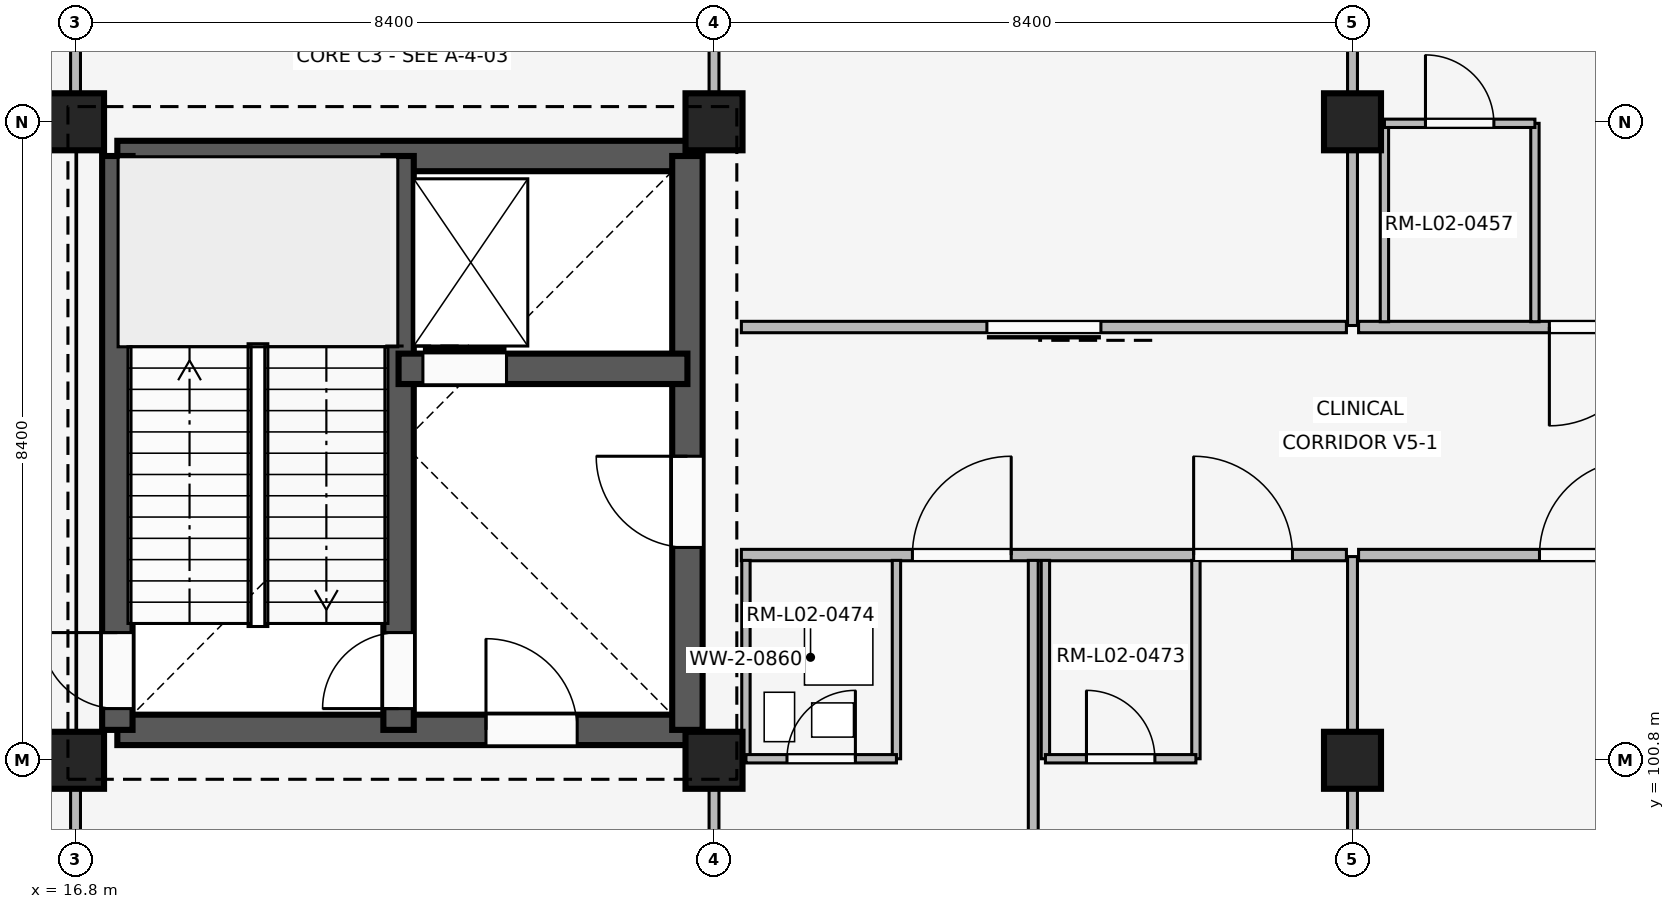
"""IFC4 building model, lengths in metres.
Left out: names, types, materials, properties, quantities, classifications, styles, units other than length and angle.
Written with IfcOpenShell. Run it as: python <this file> out.ifc"""

import sys

from ifc_helpers import new_model, si_unit, direction, frame, frame_2d, origin, origin_2d, place, context, subcontext, project, spatial, rectangle, extrude, element, fill, save


model = new_model("IFC4")
c1 = context("Model", 3, precision=1e-05, world=origin(), true_north=direction((0.0, 1.0)))
c2 = subcontext(c1, "Body", "Model", "MODEL_VIEW")
j1 = project(units=[si_unit("LENGTHUNIT", "METRE"), si_unit("PLANEANGLEUNIT", "RADIAN")], contexts=[c1])
p1 = place(None, origin())
s1 = spatial("IfcSite", under=j1, at=p1, CompositionType="ELEMENT")
p2 = place(p1, origin())
s2 = spatial("IfcBuilding", under=s1, at=p2, CompositionType="ELEMENT")
p3 = place(p2, frame((0.0, 0.0, 8.1)))
s3 = spatial("IfcBuildingStorey", under=s2, at=p3, CompositionType="ELEMENT", Elevation=8.1)
for number, where, z_axis, x_axis in (
    (1, (16.8, 100.8, 0.0), (0.0, 0.0, 1.0), (1.0, 0.0, 0.0)),
    (2, (16.8, 109.2, 0.0), (0.0, 0.0, 1.0), (1.0, 0.0, 0.0)),
    (3, (25.2, 100.8, 0.0), (0.0, 0.0, 1.0), (1.0, 0.0, 0.0)),
    (4, (25.2, 109.2, 0.0), (0.0, 0.0, 1.0), (1.0, 0.0, 0.0)),
    (5, (33.6, 100.8, 0.0), (0.0, 0.0, 1.0), (1.0, 0.0, 0.0)),
    (6, (33.6, 109.2, 0.0), (0.0, 0.0, 1.0), (1.0, 0.0, 0.0)),
):
    element("IfcColumn", number, at=place(p3, frame(where, z_axis=z_axis, x_axis=x_axis)), inside=s3, PredefinedType="COLUMN", context=c2, shape_type="SweptSolid", body=[
        extrude(rectangle(XDim=0.75, YDim=0.75, at=origin_2d()), origin(), (0.0, 0.0, 1.0), 4.8),
    ])
p4 = place(p3, frame((17.35, 101.2, 0.0), z_axis=(0.0, 0.0, 1.0), x_axis=(1.0, 0.0, 0.0)))
e7 = element("IfcWall", 7, at=p4, inside=s3, PredefinedType="SHEAR", context=c2, shape_type="SweptSolid", body=[
    extrude(rectangle(XDim=7.5, YDim=0.4, at=frame_2d((3.75, 0.0))), origin(), (0.0, 0.0, 1.0), 4.52),
])
p5 = place(p4, frame((4.85, 0.0, 0.0)))
e8 = element("IfcOpeningElement", 8, at=p5, cuts=e7, PredefinedType="OPENING", context=c2, shape_type="SweptSolid", body=[
    extrude(rectangle(XDim=1.2, YDim=2.2, at=frame_2d((0.6, 1.1))), frame((0.0, 0.21, 0.0), z_axis=(0.0, -1.0, 0.0), x_axis=(1.0, 0.0, 0.0)), (0.0, 0.0, 1.0), 0.42),
])
p6 = place(p3, frame((17.35, 108.75, 0.0), z_axis=(0.0, 0.0, 1.0), x_axis=(1.0, 0.0, 0.0)))
e9 = element("IfcWall", 9, at=p6, inside=s3, PredefinedType="SHEAR", context=c2, shape_type="SweptSolid", body=[
    extrude(rectangle(XDim=7.5, YDim=0.4, at=frame_2d((3.75, 0.0))), origin(), (0.0, 0.0, 1.0), 4.52),
])
p7 = place(p3, frame((17.35, 101.2, 0.0), z_axis=(0.0, 0.0, 1.0), x_axis=(0.0, 1.0, 0.0)))
e10 = element("IfcWall", 10, at=p7, inside=s3, PredefinedType="SHEAR", context=c2, shape_type="SweptSolid", body=[
    extrude(rectangle(XDim=7.55, YDim=0.4, at=frame_2d((3.775, 0.0))), origin(), (0.0, 0.0, 1.0), 4.52),
])
p8 = place(p7, frame((0.28, 0.0, 0.0)))
e11 = element("IfcOpeningElement", 11, at=p8, cuts=e10, PredefinedType="OPENING", context=c2, shape_type="SweptSolid", body=[
    extrude(rectangle(XDim=1.0, YDim=2.15, at=frame_2d((0.5, 1.075))), frame((0.0, 0.21, 0.0), z_axis=(0.0, -1.0, 0.0), x_axis=(1.0, 0.0, 0.0)), (0.0, 0.0, 1.0), 0.42),
])
p9 = place(p3, frame((24.85, 101.2, 0.0), z_axis=(0.0, 0.0, 1.0), x_axis=(0.0, 1.0, 0.0)))
e12 = element("IfcWall", 12, at=p9, inside=s3, PredefinedType="SHEAR", context=c2, shape_type="SweptSolid", body=[
    extrude(rectangle(XDim=7.55, YDim=0.4, at=frame_2d((3.775, 0.0))), origin(), (0.0, 0.0, 1.0), 4.52),
])
p10 = place(p9, frame((2.4, 0.0, 0.0)))
e13 = element("IfcOpeningElement", 13, at=p10, cuts=e12, PredefinedType="OPENING", context=c2, shape_type="SweptSolid", body=[
    extrude(rectangle(XDim=1.2, YDim=2.2, at=frame_2d((0.6, 1.1))), frame((0.0, 0.21, 0.0), z_axis=(0.0, -1.0, 0.0), x_axis=(1.0, 0.0, 0.0)), (0.0, 0.0, 1.0), 0.42),
])
p11 = place(p3, frame((21.05, 101.2, 0.0), z_axis=(0.0, 0.0, 1.0), x_axis=(0.0, 1.0, 0.0)))
e14 = element("IfcWall", 14, at=p11, inside=s3, PredefinedType="SHEAR", context=c2, shape_type="SweptSolid", body=[
    extrude(rectangle(XDim=7.55, YDim=0.4, at=frame_2d((3.775, 0.0))), origin(), (0.0, 0.0, 1.0), 4.52),
])
p12 = place(p11, frame((0.28, 0.0, 0.0)))
e15 = element("IfcOpeningElement", 15, at=p12, cuts=e14, PredefinedType="OPENING", context=c2, shape_type="SweptSolid", body=[
    extrude(rectangle(XDim=1.0, YDim=2.15, at=frame_2d((0.5, 1.075))), frame((0.0, 0.21, 0.0), z_axis=(0.0, -1.0, 0.0), x_axis=(1.0, 0.0, 0.0)), (0.0, 0.0, 1.0), 0.42),
])
p13 = place(p3, frame((21.05, 105.95, 0.0), z_axis=(0.0, 0.0, 1.0), x_axis=(1.0, 0.0, 0.0)))
e16 = element("IfcWall", 16, at=p13, inside=s3, PredefinedType="SHEAR", context=c2, shape_type="SweptSolid", body=[
    extrude(rectangle(XDim=3.8, YDim=0.4, at=frame_2d((1.9, 0.0))), origin(), (0.0, 0.0, 1.0), 4.52),
])
p14 = place(p13, frame((0.32, 0.0, 0.0)))
e17 = element("IfcOpeningElement", 17, at=p14, cuts=e16, PredefinedType="OPENING", context=c2, shape_type="SweptSolid", body=[
    extrude(rectangle(XDim=1.1, YDim=2.15, at=frame_2d((0.55, 1.075))), frame((0.0, 0.21, 0.0), z_axis=(0.0, -1.0, 0.0), x_axis=(1.0, 0.0, 0.0)), (0.0, 0.0, 1.0), 0.42),
])
p15 = place(p3, frame((16.8, 92.54, 0.0), z_axis=(0.0, 0.0, 1.0), x_axis=(0.0, 1.0, 0.0)))
e18 = element("IfcWall", 18, at=p15, inside=s3, PredefinedType="PARTITIONING", context=c2, shape_type="SweptSolid", body=[
    extrude(rectangle(XDim=8.21, YDim=0.13, at=frame_2d((4.105, 0.0))), origin(), (0.0, 0.0, 1.0), 3.84),
])
p16 = place(p3, frame((16.8, 109.55, 0.0), z_axis=(0.0, 0.0, 1.0), x_axis=(0.0, 1.0, 0.0)))
e19 = element("IfcWall", 19, at=p16, inside=s3, PredefinedType="PARTITIONING", context=c2, shape_type="SweptSolid", body=[
    extrude(rectangle(XDim=7.91, YDim=0.13, at=frame_2d((3.955, 0.0))), origin(), (0.0, 0.0, 1.0), 3.84),
])
p17 = place(p3, frame((25.2, 92.54, 0.0), z_axis=(0.0, 0.0, 1.0), x_axis=(0.0, 1.0, 0.0)))
e20 = element("IfcWall", 20, at=p17, inside=s3, PredefinedType="PARTITIONING", context=c2, shape_type="SweptSolid", body=[
    extrude(rectangle(XDim=8.21, YDim=0.13, at=frame_2d((4.105, 0.0))), origin(), (0.0, 0.0, 1.0), 3.84),
])
p18 = place(p17, frame((3.64, 0.0, 0.0)))
e21 = element("IfcOpeningElement", 21, at=p18, cuts=e20, PredefinedType="OPENING", context=c2, shape_type="SweptSolid", body=[
    extrude(rectangle(XDim=1.08, YDim=2.15, at=frame_2d((0.54, 1.075))), frame((0.0, 0.075, 0.0), z_axis=(0.0, -1.0, 0.0), x_axis=(1.0, 0.0, 0.0)), (0.0, 0.0, 1.0), 0.15),
])
p19 = place(p3, frame((25.2, 109.55, 0.0), z_axis=(0.0, 0.0, 1.0), x_axis=(0.0, 1.0, 0.0)))
e22 = element("IfcWall", 22, at=p19, inside=s3, PredefinedType="PARTITIONING", context=c2, shape_type="SweptSolid", body=[
    extrude(rectangle(XDim=7.91, YDim=0.13, at=frame_2d((3.955, 0.0))), origin(), (0.0, 0.0, 1.0), 3.84),
])
p20 = place(p19, frame((3.4, 0.0, 0.0)))
e23 = element("IfcOpeningElement", 23, at=p20, cuts=e22, PredefinedType="OPENING", context=c2, shape_type="SweptSolid", body=[
    extrude(rectangle(XDim=1.05, YDim=2.2, at=frame_2d((0.525, 1.1))), frame((0.0, 0.075, 0.0), z_axis=(0.0, -1.0, 0.0), x_axis=(1.0, 0.0, 0.0)), (0.0, 0.0, 1.0), 0.15),
])
p21 = place(p3, frame((25.56, 103.5, 0.0), z_axis=(0.0, 0.0, 1.0), x_axis=(1.0, 0.0, 0.0)))
e24 = element("IfcWall", 24, at=p21, inside=s3, PredefinedType="PARTITIONING", context=c2, shape_type="SweptSolid", body=[
    extrude(rectangle(XDim=7.96, YDim=0.15, at=frame_2d((3.98, 0.0))), origin(), (0.0, 0.0, 1.0), 3.84),
])
p22 = place(p21, frame((2.25, 0.0, 0.0)))
e25 = element("IfcOpeningElement", 25, at=p22, cuts=e24, PredefinedType="OPENING", context=c2, shape_type="SweptSolid", body=[
    extrude(rectangle(XDim=1.3, YDim=2.25, at=frame_2d((0.65, 1.125))), frame((0.0, 0.085, 0.0), z_axis=(0.0, -1.0, 0.0), x_axis=(1.0, 0.0, 0.0)), (0.0, 0.0, 1.0), 0.17),
])
p23 = place(p21, frame((5.95, 0.0, 0.0)))
e26 = element("IfcOpeningElement", 26, at=p23, cuts=e24, PredefinedType="OPENING", context=c2, shape_type="SweptSolid", body=[
    extrude(rectangle(XDim=1.3, YDim=2.25, at=frame_2d((0.65, 1.125))), frame((0.0, 0.085, 0.0), z_axis=(0.0, -1.0, 0.0), x_axis=(1.0, 0.0, 0.0)), (0.0, 0.0, 1.0), 0.17),
])
p24 = place(p3, frame((29.4, 92.5, 0.0), z_axis=(0.0, 0.0, 1.0), x_axis=(0.0, 1.0, 0.0)))
e27 = element("IfcWall", 27, at=p24, inside=s3, PredefinedType="PARTITIONING", context=c2, shape_type="SweptSolid", body=[
    extrude(rectangle(XDim=10.93, YDim=0.13, at=frame_2d((5.465, 0.0))), origin(), (0.0, 0.0, 1.0), 3.84),
])
for number, where, z_axis, x_axis in (
    (28, (25.62, 100.82, 0.0), (0.0, 0.0, 1.0), (0.0, 1.0, 0.0)),
    (29, (27.6, 100.82, 0.0), (0.0, 0.0, 1.0), (0.0, 1.0, 0.0)),
):
    element("IfcWall", number, at=place(p3, frame(where, z_axis=z_axis, x_axis=x_axis)), inside=s3, PredefinedType="PARTITIONING", context=c2, shape_type="SweptSolid", body=[
        extrude(rectangle(XDim=2.61, YDim=0.11, at=frame_2d((1.305, 0.0))), origin(), (0.0, 0.0, 1.0), 3.84),
    ])
p25 = place(p3, frame((25.62, 100.82, 0.0), z_axis=(0.0, 0.0, 1.0), x_axis=(1.0, 0.0, 0.0)))
e30 = element("IfcWall", 30, at=p25, inside=s3, PredefinedType="PARTITIONING", context=c2, shape_type="SweptSolid", body=[
    extrude(rectangle(XDim=1.98, YDim=0.11, at=frame_2d((0.99, 0.0))), origin(), (0.0, 0.0, 1.0), 3.84),
])
p26 = place(p25, frame((0.54, 0.0, 0.0)))
e31 = element("IfcOpeningElement", 31, at=p26, cuts=e30, PredefinedType="OPENING", context=c2, shape_type="SweptSolid", body=[
    extrude(rectangle(XDim=0.9, YDim=2.1, at=frame_2d((0.45, 1.05))), frame((0.0, 0.065, 0.0), z_axis=(0.0, -1.0, 0.0), x_axis=(1.0, 0.0, 0.0)), (0.0, 0.0, 1.0), 0.13),
])
for number, where, z_axis, x_axis in (
    (32, (29.56, 100.82, 0.0), (0.0, 0.0, 1.0), (0.0, 1.0, 0.0)),
    (33, (31.54, 100.82, 0.0), (0.0, 0.0, 1.0), (0.0, 1.0, 0.0)),
):
    element("IfcWall", number, at=place(p3, frame(where, z_axis=z_axis, x_axis=x_axis)), inside=s3, PredefinedType="PARTITIONING", context=c2, shape_type="SweptSolid", body=[
        extrude(rectangle(XDim=2.61, YDim=0.11, at=frame_2d((1.305, 0.0))), origin(), (0.0, 0.0, 1.0), 3.84),
    ])
p27 = place(p3, frame((29.56, 100.82, 0.0), z_axis=(0.0, 0.0, 1.0), x_axis=(1.0, 0.0, 0.0)))
e34 = element("IfcWall", 34, at=p27, inside=s3, PredefinedType="PARTITIONING", context=c2, shape_type="SweptSolid", body=[
    extrude(rectangle(XDim=1.98, YDim=0.11, at=frame_2d((0.99, 0.0))), origin(), (0.0, 0.0, 1.0), 3.84),
])
p28 = place(p27, frame((0.54, 0.0, 0.0)))
e35 = element("IfcOpeningElement", 35, at=p28, cuts=e34, PredefinedType="OPENING", context=c2, shape_type="SweptSolid", body=[
    extrude(rectangle(XDim=0.9, YDim=2.1, at=frame_2d((0.45, 1.05))), frame((0.0, 0.065, 0.0), z_axis=(0.0, -1.0, 0.0), x_axis=(1.0, 0.0, 0.0)), (0.0, 0.0, 1.0), 0.13),
])
p29 = place(p3, frame((33.52, 106.5, 0.0), z_axis=(0.0, 0.0, 1.0), x_axis=(-1.0, 0.0, 0.0)))
e36 = element("IfcWall", 36, at=p29, inside=s3, PredefinedType="PARTITIONING", context=c2, shape_type="SweptSolid", body=[
    extrude(rectangle(XDim=7.96, YDim=0.15, at=frame_2d((3.98, 0.0))), origin(), (0.0, 0.0, 1.0), 3.84),
])
p30 = place(p29, frame((3.23, 0.0, 0.0)))
e37 = element("IfcOpeningElement", 37, at=p30, cuts=e36, PredefinedType="OPENING", context=c2, shape_type="SweptSolid", body=[
    extrude(rectangle(XDim=1.5, YDim=2.3, at=frame_2d((0.75, 1.15))), frame((0.0, 0.085, 0.0), z_axis=(0.0, -1.0, 0.0), x_axis=(1.0, 0.0, 0.0)), (0.0, 0.0, 1.0), 0.17),
])
for number, where, z_axis, x_axis in (
    (38, (33.6, 92.54, 0.0), (0.0, 0.0, 1.0), (0.0, 1.0, 0.0)),
    (39, (33.6, 106.52, 0.0), (0.0, 0.0, 1.0), (0.0, 1.0, 0.0)),
):
    element("IfcWall", number, at=place(p3, frame(where, z_axis=z_axis, x_axis=x_axis)), inside=s3, PredefinedType="PARTITIONING", context=c2, shape_type="SweptSolid", body=[
        extrude(rectangle(XDim=10.94, YDim=0.13, at=frame_2d((5.47, 0.0))), origin(), (0.0, 0.0, 1.0), 3.84),
    ])
p31 = place(p3, frame((33.68, 103.5, 0.0), z_axis=(0.0, 0.0, 1.0), x_axis=(1.0, 0.0, 0.0)))
e40 = element("IfcWall", 40, at=p31, inside=s3, PredefinedType="PARTITIONING", context=c2, shape_type="SweptSolid", body=[
    extrude(rectangle(XDim=5.78, YDim=0.15, at=frame_2d((2.89, 0.0))), origin(), (0.0, 0.0, 1.0), 3.84),
])
p32 = place(p31, frame((2.38, 0.0, 0.0)))
e41 = element("IfcOpeningElement", 41, at=p32, cuts=e40, PredefinedType="OPENING", context=c2, shape_type="SweptSolid", body=[
    extrude(rectangle(XDim=1.25, YDim=2.2, at=frame_2d((0.625, 1.1))), frame((0.0, 0.085, 0.0), z_axis=(0.0, -1.0, 0.0), x_axis=(1.0, 0.0, 0.0)), (0.0, 0.0, 1.0), 0.17),
])
p33 = place(p3, frame((41.64, 106.5, 0.0), z_axis=(0.0, 0.0, 1.0), x_axis=(-1.0, 0.0, 0.0)))
e42 = element("IfcWall", 42, at=p33, inside=s3, PredefinedType="PARTITIONING", context=c2, shape_type="SweptSolid", body=[
    extrude(rectangle(XDim=7.96, YDim=0.15, at=frame_2d((3.98, 0.0))), origin(), (0.0, 0.0, 1.0), 3.84),
])
p34 = place(p33, frame((0.45, 0.0, 0.0)))
e43 = element("IfcOpeningElement", 43, at=p34, cuts=e42, PredefinedType="OPENING", context=c2, shape_type="SweptSolid", body=[
    extrude(rectangle(XDim=1.3, YDim=2.25, at=frame_2d((0.65, 1.125))), frame((0.0, 0.085, 0.0), z_axis=(0.0, -1.0, 0.0), x_axis=(1.0, 0.0, 0.0)), (0.0, 0.0, 1.0), 0.17),
])
p35 = place(p33, frame((4.15, 0.0, 0.0)))
e44 = element("IfcOpeningElement", 44, at=p35, cuts=e42, PredefinedType="OPENING", context=c2, shape_type="SweptSolid", body=[
    extrude(rectangle(XDim=1.3, YDim=2.25, at=frame_2d((0.65, 1.125))), frame((0.0, 0.085, 0.0), z_axis=(0.0, -1.0, 0.0), x_axis=(1.0, 0.0, 0.0)), (0.0, 0.0, 1.0), 0.17),
])
for number, where, z_axis, x_axis in (
    (45, (34.02, 106.57, 0.0), (0.0, 0.0, 1.0), (0.0, 1.0, 0.0)),
    (46, (36.0, 106.57, 0.0), (0.0, 0.0, 1.0), (0.0, 1.0, 0.0)),
):
    element("IfcWall", number, at=place(p3, frame(where, z_axis=z_axis, x_axis=x_axis)), inside=s3, PredefinedType="PARTITIONING", context=c2, shape_type="SweptSolid", body=[
        extrude(rectangle(XDim=2.61, YDim=0.11, at=frame_2d((1.305, 0.0))), origin(), (0.0, 0.0, 1.0), 3.84),
    ])
p36 = place(p3, frame((34.02, 109.18, 0.0), z_axis=(0.0, 0.0, 1.0), x_axis=(1.0, 0.0, 0.0)))
e47 = element("IfcWall", 47, at=p36, inside=s3, PredefinedType="PARTITIONING", context=c2, shape_type="SweptSolid", body=[
    extrude(rectangle(XDim=1.98, YDim=0.11, at=frame_2d((0.99, 0.0))), origin(), (0.0, 0.0, 1.0), 3.84),
])
p37 = place(p36, frame((0.54, 0.0, 0.0)))
e48 = element("IfcOpeningElement", 48, at=p37, cuts=e47, PredefinedType="OPENING", context=c2, shape_type="SweptSolid", body=[
    extrude(rectangle(XDim=0.9, YDim=2.1, at=frame_2d((0.45, 1.05))), frame((0.0, 0.065, 0.0), z_axis=(0.0, -1.0, 0.0), x_axis=(1.0, 0.0, 0.0)), (0.0, 0.0, 1.0), 0.13),
])
p38 = place(p10, origin())
e49 = element("IfcDoor", 49, at=p38, inside=s3, OperationType="SINGLE_SWING_RIGHT", PredefinedType="DOOR", context=c2, shape_type="SweptSolid", body=[
    extrude(rectangle(XDim=1.2, YDim=2.2, at=frame_2d((0.6, 1.1))), frame((0.0, 0.025, 0.0), z_axis=(0.0, -1.0, 0.0), x_axis=(1.0, 0.0, 0.0)), (0.0, 0.0, 1.0), 0.05),
])
fill(e13, e49)
p39 = place(p5, origin())
e50 = element("IfcDoor", 50, at=p39, inside=s3, OperationType="SINGLE_SWING_LEFT", PredefinedType="DOOR", context=c2, shape_type="SweptSolid", body=[
    extrude(rectangle(XDim=1.2, YDim=2.2, at=frame_2d((0.6, 1.1))), frame((0.0, 0.025, 0.0), z_axis=(0.0, -1.0, 0.0), x_axis=(1.0, 0.0, 0.0)), (0.0, 0.0, 1.0), 0.05),
])
fill(e8, e50)
p40 = place(p8, origin())
e51 = element("IfcDoor", 51, at=p40, inside=s3, OperationType="SINGLE_SWING_RIGHT", PredefinedType="DOOR", context=c2, shape_type="SweptSolid", body=[
    extrude(rectangle(XDim=1.0, YDim=2.15, at=frame_2d((0.5, 1.075))), frame((0.0, 0.025, 0.0), z_axis=(0.0, -1.0, 0.0), x_axis=(1.0, 0.0, 0.0)), (0.0, 0.0, 1.0), 0.05),
])
fill(e11, e51)
p41 = place(p12, origin())
e52 = element("IfcDoor", 52, at=p41, inside=s3, OperationType="SINGLE_SWING_LEFT", PredefinedType="DOOR", context=c2, shape_type="SweptSolid", body=[
    extrude(rectangle(XDim=1.0, YDim=2.15, at=frame_2d((0.5, 1.075))), frame((0.0, 0.025, 0.0), z_axis=(0.0, -1.0, 0.0), x_axis=(1.0, 0.0, 0.0)), (0.0, 0.0, 1.0), 0.05),
])
fill(e15, e52)
p42 = place(p14, origin())
e53 = element("IfcDoor", 53, at=p42, inside=s3, OperationType="SLIDING_TO_LEFT", PredefinedType="DOOR", context=c2, shape_type="SweptSolid", body=[
    extrude(rectangle(XDim=1.1, YDim=2.15, at=frame_2d((0.55, 1.075))), frame((0.0, 0.025, 0.0), z_axis=(0.0, -1.0, 0.0), x_axis=(1.0, 0.0, 0.0)), (0.0, 0.0, 1.0), 0.05),
])
fill(e17, e53)
p43 = place(p22, origin())
e54 = element("IfcDoor", 54, at=p43, inside=s3, OperationType="SINGLE_SWING_RIGHT", PredefinedType="DOOR", context=c2, shape_type="SweptSolid", body=[
    extrude(rectangle(XDim=1.3, YDim=2.25, at=frame_2d((0.65, 1.125))), frame((0.0, 0.025, 0.0), z_axis=(0.0, -1.0, 0.0), x_axis=(1.0, 0.0, 0.0)), (0.0, 0.0, 1.0), 0.05),
])
fill(e25, e54)
p44 = place(p23, origin())
e55 = element("IfcDoor", 55, at=p44, inside=s3, OperationType="SINGLE_SWING_LEFT", PredefinedType="DOOR", context=c2, shape_type="SweptSolid", body=[
    extrude(rectangle(XDim=1.3, YDim=2.25, at=frame_2d((0.65, 1.125))), frame((0.0, 0.025, 0.0), z_axis=(0.0, -1.0, 0.0), x_axis=(1.0, 0.0, 0.0)), (0.0, 0.0, 1.0), 0.05),
])
fill(e26, e55)
p45 = place(p26, origin())
e56 = element("IfcDoor", 56, at=p45, inside=s3, OperationType="SINGLE_SWING_RIGHT", PredefinedType="DOOR", context=c2, shape_type="SweptSolid", body=[
    extrude(rectangle(XDim=0.9, YDim=2.1, at=frame_2d((0.45, 1.05))), frame((0.0, 0.025, 0.0), z_axis=(0.0, -1.0, 0.0), x_axis=(1.0, 0.0, 0.0)), (0.0, 0.0, 1.0), 0.05),
])
fill(e31, e56)
p46 = place(p28, origin())
e57 = element("IfcDoor", 57, at=p46, inside=s3, OperationType="SINGLE_SWING_LEFT", PredefinedType="DOOR", context=c2, shape_type="SweptSolid", body=[
    extrude(rectangle(XDim=0.9, YDim=2.1, at=frame_2d((0.45, 1.05))), frame((0.0, 0.025, 0.0), z_axis=(0.0, -1.0, 0.0), x_axis=(1.0, 0.0, 0.0)), (0.0, 0.0, 1.0), 0.05),
])
fill(e35, e57)
p47 = place(p30, origin())
e58 = element("IfcDoor", 58, at=p47, inside=s3, OperationType="SLIDING_TO_LEFT", PredefinedType="DOOR", context=c2, shape_type="SweptSolid", body=[
    extrude(rectangle(XDim=1.5, YDim=2.3, at=frame_2d((0.75, 1.15))), frame((0.0, 0.025, 0.0), z_axis=(0.0, -1.0, 0.0), x_axis=(1.0, 0.0, 0.0)), (0.0, 0.0, 1.0), 0.05),
])
fill(e37, e58)
p48 = place(p32, origin())
e59 = element("IfcDoor", 59, at=p48, inside=s3, OperationType="SINGLE_SWING_RIGHT", PredefinedType="DOOR", context=c2, shape_type="SweptSolid", body=[
    extrude(rectangle(XDim=1.25, YDim=2.2, at=frame_2d((0.625, 1.1))), frame((0.0, 0.025, 0.0), z_axis=(0.0, -1.0, 0.0), x_axis=(1.0, 0.0, 0.0)), (0.0, 0.0, 1.0), 0.05),
])
fill(e41, e59)
p49 = place(p35, origin())
e60 = element("IfcDoor", 60, at=p49, inside=s3, OperationType="SINGLE_SWING_RIGHT", PredefinedType="DOOR", context=c2, shape_type="SweptSolid", body=[
    extrude(rectangle(XDim=1.3, YDim=2.25, at=frame_2d((0.65, 1.125))), frame((0.0, 0.025, 0.0), z_axis=(0.0, -1.0, 0.0), x_axis=(1.0, 0.0, 0.0)), (0.0, 0.0, 1.0), 0.05),
])
fill(e44, e60)
p50 = place(p37, origin())
e61 = element("IfcDoor", 61, at=p50, inside=s3, OperationType="SINGLE_SWING_LEFT", PredefinedType="DOOR", context=c2, shape_type="SweptSolid", body=[
    extrude(rectangle(XDim=0.9, YDim=2.1, at=frame_2d((0.45, 1.05))), frame((0.0, 0.025, 0.0), z_axis=(0.0, -1.0, 0.0), x_axis=(1.0, 0.0, 0.0)), (0.0, 0.0, 1.0), 0.05),
])
fill(e48, e61)
save(model, sys.argv[1])
